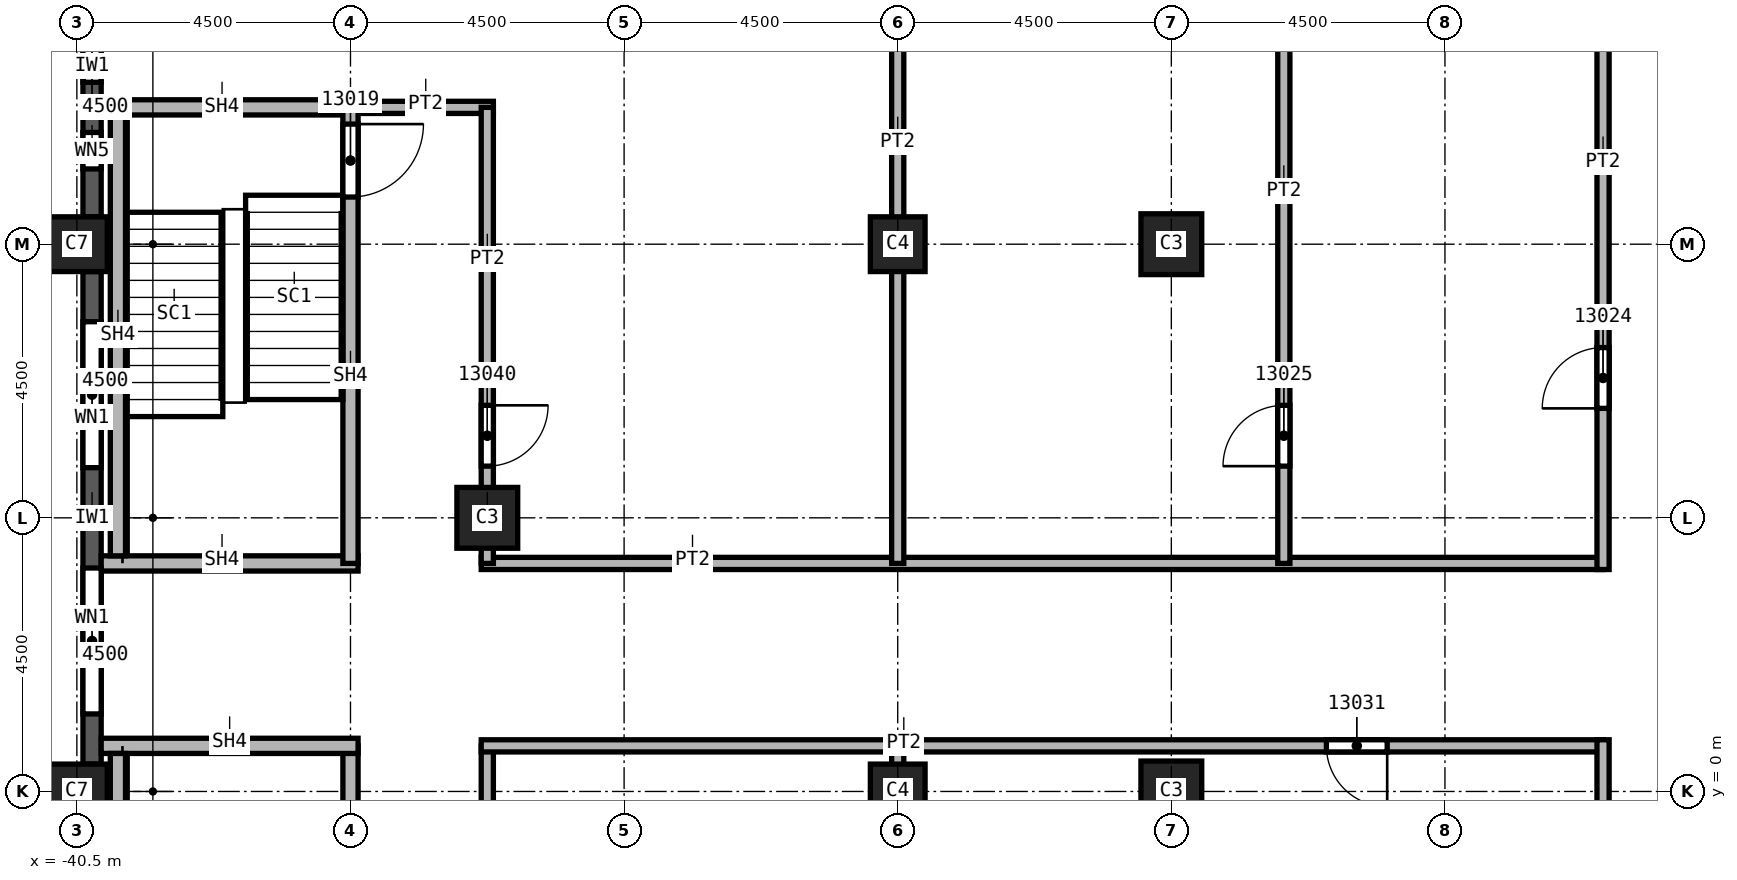
"""IFC4 building model, lengths in metres.
Left out: names, types, materials, properties, quantities, classifications, styles, units other than length and angle.
Written with IfcOpenShell. Run it as: python <this file> out.ifc"""

import sys

from ifc_helpers import new_model, si_unit, direction, frame, frame_2d, origin, origin_2d, place, context, subcontext, project, spatial, rectangle, extrude, element, fill, save


model = new_model("IFC4")
c1 = context("Model", 3, precision=1e-05, world=origin(), true_north=direction((0.0, 1.0)))
c2 = subcontext(c1, "Body", "Model", "MODEL_VIEW")
j1 = project(units=[si_unit("LENGTHUNIT", "METRE"), si_unit("PLANEANGLEUNIT", "RADIAN")], contexts=[c1])
p1 = place(None, origin())
s1 = spatial("IfcSite", under=j1, at=p1, CompositionType="ELEMENT")
p2 = place(p1, origin())
s2 = spatial("IfcBuilding", under=s1, at=p2, CompositionType="ELEMENT")
p3 = place(p2, frame((0.0, 0.0, 208.0)))
s3 = spatial("IfcBuildingStorey", under=s2, at=p3, CompositionType="ELEMENT", Elevation=208.0)
for number, where, z_axis, x_axis in (
    (1, (-40.5, 0.0, 0.0), (0.0, 0.0, 1.0), (0.0, 1.0, 0.0)),
    (2, (-40.5, 9.0, 0.0), (0.0, 0.0, 1.0), (0.0, 1.0, 0.0)),
):
    element("IfcColumn", number, at=place(p3, frame(where, z_axis=z_axis, x_axis=x_axis)), inside=s3, PredefinedType="COLUMN", context=c2, shape_type="SweptSolid", body=[
        extrude(rectangle(XDim=0.9, YDim=1.0, at=origin_2d()), origin(), (0.0, 0.0, 1.0), 3.72),
    ])
for number, where, z_axis, x_axis in (
    (3, (-33.75, 4.5, 0.0), (0.0, 0.0, 1.0), (1.0, 0.0, 0.0)),
    (4, (-22.5, 0.0, 0.0), (0.0, 0.0, 1.0), (1.0, 0.0, 0.0)),
    (5, (-22.5, 9.0, 0.0), (0.0, 0.0, 1.0), (1.0, 0.0, 0.0)),
):
    element("IfcColumn", number, at=place(p3, frame(where, z_axis=z_axis, x_axis=x_axis)), inside=s3, PredefinedType="COLUMN", context=c2, shape_type="SweptSolid", body=[
        extrude(rectangle(XDim=1.0, YDim=1.0, at=origin_2d()), origin(), (0.0, 0.0, 1.0), 3.72),
    ])
for number, where, z_axis, x_axis in (
    (6, (-27.0, 0.0, 0.0), (0.0, 0.0, 1.0), (1.0, 0.0, 0.0)),
    (7, (-27.0, 9.0, 0.0), (0.0, 0.0, 1.0), (1.0, 0.0, 0.0)),
):
    element("IfcColumn", number, at=place(p3, frame(where, z_axis=z_axis, x_axis=x_axis)), inside=s3, PredefinedType="COLUMN", context=c2, shape_type="SweptSolid", body=[
        extrude(rectangle(XDim=0.9, YDim=0.9, at=origin_2d()), origin(), (0.0, 0.0, 1.0), 3.72),
    ])
p4 = place(p3, frame((-40.25, 13.05, 0.0), z_axis=(0.0, 0.0, 1.0), x_axis=(0.0, -1.0, 0.0)))
e8 = element("IfcWall", 8, at=p4, inside=s3, PredefinedType="SOLIDWALL", context=c2, shape_type="SweptSolid", body=[
    extrude(rectangle(XDim=3.6, YDim=0.3, at=frame_2d((1.8, 0.0))), origin(), (0.0, 0.0, 1.0), 3.12),
])
p5 = place(p4, frame((0.788, 0.0, 0.8)))
e9 = element("IfcOpeningElement", 9, at=p5, cuts=e8, PredefinedType="OPENING", context=c2, shape_type="SweptSolid", body=[
    extrude(rectangle(XDim=0.6, YDim=1.95, at=frame_2d((0.3, 0.975))), frame((0.0, 0.15, 0.0), z_axis=(0.0, -1.0, 0.0), x_axis=(1.0, 0.0, 0.0)), (0.0, 0.0, 1.0), 0.3),
])
p6 = place(p4, frame((2.212, 0.0, 0.8)))
e10 = element("IfcOpeningElement", 10, at=p6, cuts=e8, PredefinedType="OPENING", context=c2, shape_type="SweptSolid", body=[
    extrude(rectangle(XDim=0.6, YDim=1.95, at=frame_2d((0.3, 0.975))), frame((0.0, 0.15, 0.0), z_axis=(0.0, -1.0, 0.0), x_axis=(1.0, 0.0, 0.0)), (0.0, 0.0, 1.0), 0.3),
])
p7 = place(p3, frame((-40.25, 8.55, 0.0), z_axis=(0.0, 0.0, 1.0), x_axis=(0.0, -1.0, 0.0)))
e11 = element("IfcWall", 11, at=p7, inside=s3, PredefinedType="SOLIDWALL", context=c2, shape_type="SweptSolid", body=[
    extrude(rectangle(XDim=8.1, YDim=0.3, at=frame_2d((4.05, 0.0))), origin(), (0.0, 0.0, 1.0), 3.12),
])
p8 = place(p7, frame((0.825, 0.0, 0.8)))
e12 = element("IfcOpeningElement", 12, at=p8, cuts=e11, PredefinedType="OPENING", context=c2, shape_type="SweptSolid", body=[
    extrude(rectangle(XDim=2.4, YDim=1.95, at=frame_2d((1.2, 0.975))), frame((0.0, 0.15, 0.0), z_axis=(0.0, -1.0, 0.0), x_axis=(1.0, 0.0, 0.0)), (0.0, 0.0, 1.0), 0.3),
])
p9 = place(p7, frame((4.875, 0.0, 0.8)))
e13 = element("IfcOpeningElement", 13, at=p9, cuts=e11, PredefinedType="OPENING", context=c2, shape_type="SweptSolid", body=[
    extrude(rectangle(XDim=2.4, YDim=1.95, at=frame_2d((1.2, 0.975))), frame((0.0, 0.15, 0.0), z_axis=(0.0, -1.0, 0.0), x_axis=(1.0, 0.0, 0.0)), (0.0, 0.0, 1.0), 0.3),
])
p10 = place(p3, frame((-36.0, 11.25, 0.0), z_axis=(0.0, 0.0, 1.0), x_axis=(1.0, 0.0, 0.0)))
e14 = element("IfcWall", 14, at=p10, inside=s3, PredefinedType="PARTITIONING", context=c2, shape_type="SweptSolid", body=[
    extrude(rectangle(XDim=2.35, YDim=0.2, at=frame_2d((1.175, 0.0))), origin(), (0.0, 0.0, 1.0), 3.72),
])
p11 = place(p3, frame((-33.85, 3.75, 0.0), z_axis=(0.0, 0.0, 1.0), x_axis=(1.0, 0.0, 0.0)))
e15 = element("IfcWall", 15, at=p11, inside=s3, PredefinedType="PARTITIONING", context=c2, shape_type="SweptSolid", body=[
    extrude(rectangle(XDim=18.45, YDim=0.2, at=frame_2d((9.225, 0.0))), origin(), (0.0, 0.0, 1.0), 3.72),
])
p12 = place(p3, frame((-33.75, 0.75, 0.0), z_axis=(0.0, 0.0, 1.0), x_axis=(0.0, -1.0, 0.0)))
e16 = element("IfcWall", 16, at=p12, inside=s3, PredefinedType="PARTITIONING", context=c2, shape_type="SweptSolid", body=[
    extrude(rectangle(XDim=7.6, YDim=0.2, at=frame_2d((3.8, 0.0))), origin(), (0.0, 0.0, 1.0), 3.72),
])
p13 = place(p12, frame((6.1, 0.0, 0.0)))
e17 = element("IfcOpeningElement", 17, at=p13, cuts=e16, PredefinedType="OPENING", context=c2, shape_type="SweptSolid", body=[
    extrude(rectangle(XDim=1.0, YDim=2.1, at=frame_2d((0.5, 1.05))), frame((0.0, 0.1, 0.0), z_axis=(0.0, -1.0, 0.0), x_axis=(1.0, 0.0, 0.0)), (0.0, 0.0, 1.0), 0.2),
])
p14 = place(p3, frame((-33.75, 11.25, 0.0), z_axis=(0.0, 0.0, 1.0), x_axis=(0.0, -1.0, 0.0)))
e18 = element("IfcWall", 18, at=p14, inside=s3, PredefinedType="PARTITIONING", context=c2, shape_type="SweptSolid", body=[
    extrude(rectangle(XDim=7.5, YDim=0.2, at=frame_2d((3.75, 0.0))), origin(), (0.0, 0.0, 1.0), 3.72),
])
p15 = place(p14, frame((4.9, 0.0, 0.0)))
e19 = element("IfcOpeningElement", 19, at=p15, cuts=e18, PredefinedType="OPENING", context=c2, shape_type="SweptSolid", body=[
    extrude(rectangle(XDim=1.0, YDim=2.1, at=frame_2d((0.5, 1.05))), frame((0.0, 0.1, 0.0), z_axis=(0.0, -1.0, 0.0), x_axis=(1.0, 0.0, 0.0)), (0.0, 0.0, 1.0), 0.2),
])
p16 = place(p3, frame((-27.0, -17.5, 0.0), z_axis=(0.0, 0.0, 1.0), x_axis=(0.0, 1.0, 0.0)))
e20 = element("IfcWall", 20, at=p16, inside=s3, PredefinedType="PARTITIONING", context=c2, shape_type="SweptSolid", body=[
    extrude(rectangle(XDim=18.25, YDim=0.2, at=frame_2d((9.125, 0.0))), origin(), (0.0, 0.0, 1.0), 3.72),
])
p17 = place(p3, frame((-27.0, 3.75, 0.0), z_axis=(0.0, 0.0, 1.0), x_axis=(0.0, 1.0, 0.0)))
e21 = element("IfcWall", 21, at=p17, inside=s3, PredefinedType="PARTITIONING", context=c2, shape_type="SweptSolid", body=[
    extrude(rectangle(XDim=13.75, YDim=0.2, at=frame_2d((6.875, 0.0))), origin(), (0.0, 0.0, 1.0), 3.72),
])
p18 = place(p3, frame((-15.4, 0.75, 0.0), z_axis=(0.0, 0.0, 1.0), x_axis=(-1.0, 0.0, 0.0)))
e22 = element("IfcWall", 22, at=p18, inside=s3, PredefinedType="PARTITIONING", context=c2, shape_type="SweptSolid", body=[
    extrude(rectangle(XDim=18.45, YDim=0.2, at=frame_2d((9.225, 0.0))), origin(), (0.0, 0.0, 1.0), 3.72),
])
p19 = place(p18, frame((3.55, 0.0, 0.0)))
e23 = element("IfcOpeningElement", 23, at=p19, cuts=e22, PredefinedType="OPENING", context=c2, shape_type="SweptSolid", body=[
    extrude(rectangle(XDim=1.0, YDim=2.1, at=frame_2d((0.5, 1.05))), frame((0.0, 0.1, 0.0), z_axis=(0.0, -1.0, 0.0), x_axis=(1.0, 0.0, 0.0)), (0.0, 0.0, 1.0), 0.2),
])
p20 = place(p3, frame((-20.65, 3.75, 0.0), z_axis=(0.0, 0.0, 1.0), x_axis=(0.0, 1.0, 0.0)))
e24 = element("IfcWall", 24, at=p20, inside=s3, PredefinedType="PARTITIONING", context=c2, shape_type="SweptSolid", body=[
    extrude(rectangle(XDim=9.75, YDim=0.2, at=frame_2d((4.875, 0.0))), origin(), (0.0, 0.0, 1.0), 3.72),
])
p21 = place(p20, frame((1.6, 0.0, 0.0)))
e25 = element("IfcOpeningElement", 25, at=p21, cuts=e24, PredefinedType="OPENING", context=c2, shape_type="SweptSolid", body=[
    extrude(rectangle(XDim=1.0, YDim=2.1, at=frame_2d((0.5, 1.05))), frame((0.0, 0.1, 0.0), z_axis=(0.0, -1.0, 0.0), x_axis=(1.0, 0.0, 0.0)), (0.0, 0.0, 1.0), 0.2),
])
p22 = place(p3, frame((-15.4, -22.4, 0.0), z_axis=(0.0, 0.0, 1.0), x_axis=(0.0, 1.0, 0.0)))
e26 = element("IfcWall", 26, at=p22, inside=s3, PredefinedType="PARTITIONING", context=c2, shape_type="SweptSolid", body=[
    extrude(rectangle(XDim=23.25, YDim=0.2, at=frame_2d((11.625, 0.0))), origin(), (0.0, 0.0, 1.0), 3.72),
])
p23 = place(p22, frame((5.2, 0.0, 0.0)))
e27 = element("IfcOpeningElement", 27, at=p23, cuts=e26, PredefinedType="OPENING", context=c2, shape_type="SweptSolid", body=[
    extrude(rectangle(XDim=1.0, YDim=2.1, at=frame_2d((0.5, 1.05))), frame((0.0, 0.1, 0.0), z_axis=(0.0, -1.0, 0.0), x_axis=(1.0, 0.0, 0.0)), (0.0, 0.0, 1.0), 0.2),
])
p24 = place(p22, frame((9.95, 0.0, 0.0)))
e28 = element("IfcOpeningElement", 28, at=p24, cuts=e26, PredefinedType="OPENING", context=c2, shape_type="SweptSolid", body=[
    extrude(rectangle(XDim=1.0, YDim=2.1, at=frame_2d((0.5, 1.05))), frame((0.0, 0.1, 0.0), z_axis=(0.0, -1.0, 0.0), x_axis=(1.0, 0.0, 0.0)), (0.0, 0.0, 1.0), 0.2),
])
p25 = place(p22, frame((12.95, 0.0, 0.0)))
e29 = element("IfcOpeningElement", 29, at=p25, cuts=e26, PredefinedType="OPENING", context=c2, shape_type="SweptSolid", body=[
    extrude(rectangle(XDim=1.0, YDim=2.1, at=frame_2d((0.5, 1.05))), frame((0.0, 0.1, 0.0), z_axis=(0.0, -1.0, 0.0), x_axis=(1.0, 0.0, 0.0)), (0.0, 0.0, 1.0), 0.2),
])
p26 = place(p22, frame((16.1, 0.0, 0.0)))
e30 = element("IfcOpeningElement", 30, at=p26, cuts=e26, PredefinedType="OPENING", context=c2, shape_type="SweptSolid", body=[
    extrude(rectangle(XDim=1.0, YDim=2.1, at=frame_2d((0.5, 1.05))), frame((0.0, 0.1, 0.0), z_axis=(0.0, -1.0, 0.0), x_axis=(1.0, 0.0, 0.0)), (0.0, 0.0, 1.0), 0.2),
])
p27 = place(p3, frame((-15.4, 3.65, 0.0), z_axis=(0.0, 0.0, 1.0), x_axis=(0.0, 1.0, 0.0)))
e31 = element("IfcWall", 31, at=p27, inside=s3, PredefinedType="PARTITIONING", context=c2, shape_type="SweptSolid", body=[
    extrude(rectangle(XDim=9.95, YDim=0.2, at=frame_2d((4.975, 0.0))), origin(), (0.0, 0.0, 1.0), 3.72),
])
p28 = place(p27, frame((2.65, 0.0, 0.0)))
e32 = element("IfcOpeningElement", 32, at=p28, cuts=e31, PredefinedType="OPENING", context=c2, shape_type="SweptSolid", body=[
    extrude(rectangle(XDim=1.0, YDim=2.1, at=frame_2d((0.5, 1.05))), frame((0.0, 0.1, 0.0), z_axis=(0.0, -1.0, 0.0), x_axis=(1.0, 0.0, 0.0)), (0.0, 0.0, 1.0), 0.2),
])
p29 = place(p3, frame((-40.1, 3.75, 0.0), z_axis=(0.0, 0.0, 1.0), x_axis=(1.0, 0.0, 0.0)))
e33 = element("IfcWall", 33, at=p29, inside=s3, PredefinedType="SOLIDWALL", context=c2, shape_type="SweptSolid", body=[
    extrude(rectangle(XDim=4.225, YDim=0.25, at=frame_2d((2.113, 0.0))), origin(), (0.0, 0.0, 1.0), 3.72),
])
p30 = place(p3, frame((-40.1, 11.25, 0.0), z_axis=(0.0, 0.0, 1.0), x_axis=(1.0, 0.0, 0.0)))
e34 = element("IfcWall", 34, at=p30, inside=s3, PredefinedType="SOLIDWALL", context=c2, shape_type="SweptSolid", body=[
    extrude(rectangle(XDim=4.1, YDim=0.25, at=frame_2d((2.05, 0.0))), origin(), (0.0, 0.0, 1.0), 3.72),
])
p31 = place(p3, frame((-36.0, 0.75, 0.0), z_axis=(0.0, 0.0, 1.0), x_axis=(0.0, -1.0, 0.0)))
e35 = element("IfcWall", 35, at=p31, inside=s3, PredefinedType="SOLIDWALL", context=c2, shape_type="SweptSolid", body=[
    extrude(rectangle(XDim=7.625, YDim=0.25, at=frame_2d((3.812, 0.0))), origin(), (0.0, 0.0, 1.0), 3.72),
])
p32 = place(p31, frame((5.95, 0.0, 0.0)))
e36 = element("IfcOpeningElement", 36, at=p32, cuts=e35, PredefinedType="OPENING", context=c2, shape_type="SweptSolid", body=[
    extrude(rectangle(XDim=1.2, YDim=2.1, at=frame_2d((0.6, 1.05))), frame((0.0, 0.125, 0.0), z_axis=(0.0, -1.0, 0.0), x_axis=(1.0, 0.0, 0.0)), (0.0, 0.0, 1.0), 0.25),
])
p33 = place(p3, frame((-36.0, 11.375, 0.0), z_axis=(0.0, 0.0, 1.0), x_axis=(0.0, -1.0, 0.0)))
e37 = element("IfcWall", 37, at=p33, inside=s3, PredefinedType="SOLIDWALL", context=c2, shape_type="SweptSolid", body=[
    extrude(rectangle(XDim=7.625, YDim=0.25, at=frame_2d((3.812, 0.0))), origin(), (0.0, 0.0, 1.0), 3.72),
])
p34 = place(p33, frame((0.4, 0.0, 0.0)))
e38 = element("IfcOpeningElement", 38, at=p34, cuts=e37, PredefinedType="OPENING", context=c2, shape_type="SweptSolid", body=[
    extrude(rectangle(XDim=1.2, YDim=2.1, at=frame_2d((0.6, 1.05))), frame((0.0, 0.125, 0.0), z_axis=(0.0, -1.0, 0.0), x_axis=(1.0, 0.0, 0.0)), (0.0, 0.0, 1.0), 0.25),
])
p35 = place(p3, frame((-35.875, 0.75, 0.0), z_axis=(0.0, 0.0, 1.0), x_axis=(-1.0, 0.0, 0.0)))
e39 = element("IfcWall", 39, at=p35, inside=s3, PredefinedType="SOLIDWALL", context=c2, shape_type="SweptSolid", body=[
    extrude(rectangle(XDim=4.225, YDim=0.25, at=frame_2d((2.113, 0.0))), origin(), (0.0, 0.0, 1.0), 3.72),
])
for number, where, z_axis, x_axis in (
    (40, (-39.825, 3.875, 0.0), (0.0, 0.0, 1.0), (0.0, 1.0, 0.0)),
    (41, (-39.825, -6.625, 0.0), (0.0, 0.0, 1.0), (0.0, 1.0, 0.0)),
):
    element("IfcWall", number, at=place(p3, frame(where, z_axis=z_axis, x_axis=x_axis)), inside=s3, PredefinedType="SOLIDWALL", context=c2, shape_type="SweptSolid", body=[
        extrude(rectangle(XDim=7.25, YDim=0.25, at=frame_2d((3.625, 0.0))), origin(), (0.0, 0.0, 1.0), 3.72),
    ])
p36 = place(p8, origin())
e42 = element("IfcWindow", 42, at=p36, inside=s3, PartitioningType="SINGLE_PANEL", PredefinedType="WINDOW", context=c2, shape_type="SweptSolid", body=[
    extrude(rectangle(XDim=2.4, YDim=1.95, at=frame_2d((1.2, 0.975))), frame((0.0, 0.03, 0.0), z_axis=(0.0, -1.0, 0.0), x_axis=(1.0, 0.0, 0.0)), (0.0, 0.0, 1.0), 0.06),
])
fill(e12, e42)
p37 = place(p9, origin())
e43 = element("IfcWindow", 43, at=p37, inside=s3, PartitioningType="SINGLE_PANEL", PredefinedType="WINDOW", context=c2, shape_type="SweptSolid", body=[
    extrude(rectangle(XDim=2.4, YDim=1.95, at=frame_2d((1.2, 0.975))), frame((0.0, 0.03, 0.0), z_axis=(0.0, -1.0, 0.0), x_axis=(1.0, 0.0, 0.0)), (0.0, 0.0, 1.0), 0.06),
])
fill(e13, e43)
p38 = place(p34, origin())
e44 = element("IfcDoor", 44, at=p38, inside=s3, OperationType="SINGLE_SWING_RIGHT", PredefinedType="DOOR", context=c2, shape_type="SweptSolid", body=[
    extrude(rectangle(XDim=1.2, YDim=2.1, at=frame_2d((0.6, 1.05))), frame((0.0, 0.025, 0.0), z_axis=(0.0, -1.0, 0.0), x_axis=(1.0, 0.0, 0.0)), (0.0, 0.0, 1.0), 0.05),
])
fill(e38, e44)
p39 = place(p28, origin())
e45 = element("IfcDoor", 45, at=p39, inside=s3, OperationType="SINGLE_SWING_LEFT", PredefinedType="DOOR", context=c2, shape_type="SweptSolid", body=[
    extrude(rectangle(XDim=1.0, YDim=2.1, at=frame_2d((0.5, 1.05))), frame((0.0, 0.025, 0.0), z_axis=(0.0, -1.0, 0.0), x_axis=(1.0, 0.0, 0.0)), (0.0, 0.0, 1.0), 0.05),
])
fill(e32, e45)
p40 = place(p21, origin())
e46 = element("IfcDoor", 46, at=p40, inside=s3, OperationType="SINGLE_SWING_RIGHT", PredefinedType="DOOR", context=c2, shape_type="SweptSolid", body=[
    extrude(rectangle(XDim=1.0, YDim=2.1, at=frame_2d((0.5, 1.05))), frame((0.0, 0.025, 0.0), z_axis=(0.0, -1.0, 0.0), x_axis=(1.0, 0.0, 0.0)), (0.0, 0.0, 1.0), 0.05),
])
fill(e25, e46)
p41 = place(p19, origin())
e47 = element("IfcDoor", 47, at=p41, inside=s3, OperationType="SINGLE_SWING_RIGHT", PredefinedType="DOOR", context=c2, shape_type="SweptSolid", body=[
    extrude(rectangle(XDim=1.0, YDim=2.1, at=frame_2d((0.5, 1.05))), frame((0.0, 0.025, 0.0), z_axis=(0.0, -1.0, 0.0), x_axis=(1.0, 0.0, 0.0)), (0.0, 0.0, 1.0), 0.05),
])
fill(e23, e47)
p42 = place(p15, origin())
e48 = element("IfcDoor", 48, at=p42, inside=s3, OperationType="SINGLE_SWING_LEFT", PredefinedType="DOOR", context=c2, shape_type="SweptSolid", body=[
    extrude(rectangle(XDim=1.0, YDim=2.1, at=frame_2d((0.5, 1.05))), frame((0.0, 0.025, 0.0), z_axis=(0.0, -1.0, 0.0), x_axis=(1.0, 0.0, 0.0)), (0.0, 0.0, 1.0), 0.05),
])
fill(e19, e48)
p43 = place(p5, origin())
e49 = element("IfcWindow", 49, at=p43, inside=s3, PartitioningType="SINGLE_PANEL", PredefinedType="WINDOW", context=c2, shape_type="SweptSolid", body=[
    extrude(rectangle(XDim=0.6, YDim=1.95, at=frame_2d((0.3, 0.975))), frame((0.0, 0.03, 0.0), z_axis=(0.0, -1.0, 0.0), x_axis=(1.0, 0.0, 0.0)), (0.0, 0.0, 1.0), 0.06),
])
fill(e9, e49)
p44 = place(p6, origin())
e50 = element("IfcWindow", 50, at=p44, inside=s3, PartitioningType="SINGLE_PANEL", PredefinedType="WINDOW", context=c2, shape_type="SweptSolid", body=[
    extrude(rectangle(XDim=0.6, YDim=1.95, at=frame_2d((0.3, 0.975))), frame((0.0, 0.03, 0.0), z_axis=(0.0, -1.0, 0.0), x_axis=(1.0, 0.0, 0.0)), (0.0, 0.0, 1.0), 0.06),
])
fill(e10, e50)
save(model, sys.argv[1])
